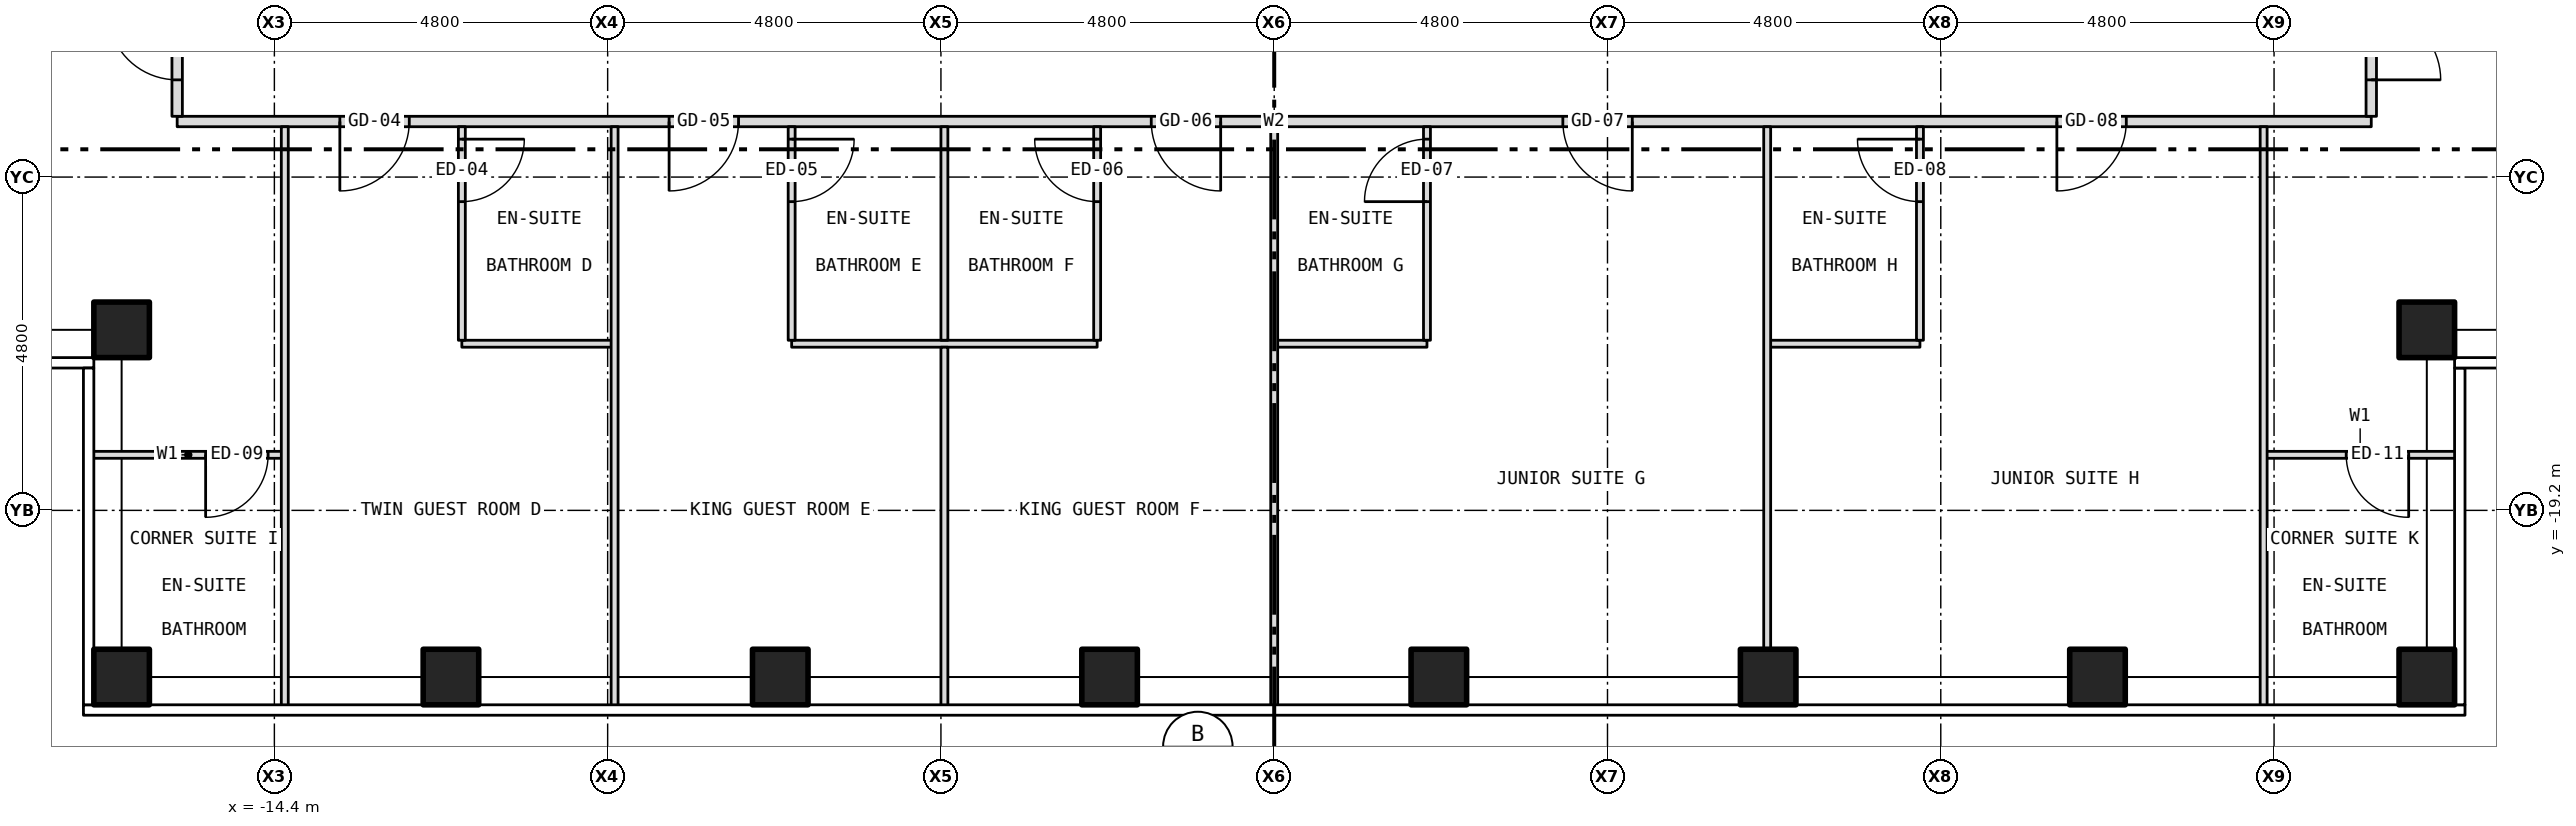
"""IFC4 building model, lengths in metres.
Left out: names, types, materials, properties, quantities, classifications, styles, units other than length and angle.
Written with IfcOpenShell. Run it as: python <this file> out.ifc"""

import sys

from ifc_helpers import new_model, si_unit, direction, frame, frame_2d, origin, origin_2d, place, context, subcontext, project, spatial, rectangle, hollow_rectangle, extrude, element, fill, save


model = new_model("IFC4")
c1 = context("Model", 3, precision=1e-05, world=origin(), true_north=direction((0.0, 1.0)))
c2 = subcontext(c1, "Body", "Model", "MODEL_VIEW")
j1 = project(units=[si_unit("LENGTHUNIT", "METRE"), si_unit("PLANEANGLEUNIT", "RADIAN")], contexts=[c1])
p1 = place(None, origin())
s1 = spatial("IfcSite", under=j1, at=p1, CompositionType="ELEMENT")
p2 = place(p1, origin())
s2 = spatial("IfcBuilding", under=s1, at=p2, CompositionType="ELEMENT")
p3 = place(p2, frame((0.0, 0.0, 151.5)))
s3 = spatial("IfcBuildingStorey", under=s2, at=p3, CompositionType="ELEMENT", Elevation=151.5)
for number, where, z_axis, x_axis in (
    (1, (-16.6, -21.6, -0.15), (0.0, 0.0, 1.0), (1.0, 0.0, 0.0)),
    (2, (-11.857, -21.6, -0.15), (0.0, 0.0, 1.0), (1.0, 0.0, 0.0)),
    (3, (-7.114, -21.6, -0.15), (0.0, 0.0, 1.0), (1.0, 0.0, 0.0)),
    (4, (-2.371, -21.6, -0.15), (0.0, 0.0, 1.0), (1.0, 0.0, 0.0)),
    (5, (2.371, -21.6, -0.15), (0.0, 0.0, 1.0), (1.0, 0.0, 0.0)),
    (6, (7.114, -21.6, -0.15), (0.0, 0.0, 1.0), (1.0, 0.0, 0.0)),
    (7, (11.857, -21.6, -0.15), (0.0, 0.0, 1.0), (1.0, 0.0, 0.0)),
    (8, (16.6, -21.6, -0.15), (0.0, 0.0, 1.0), (1.0, 0.0, 0.0)),
    (9, (-16.6, -16.6, -0.15), (0.0, 0.0, 1.0), (1.0, 0.0, 0.0)),
    (10, (16.6, -16.6, -0.15), (0.0, 0.0, 1.0), (1.0, 0.0, 0.0)),
):
    element("IfcColumn", number, at=place(p3, frame(where, z_axis=z_axis, x_axis=x_axis)), inside=s3, PredefinedType="COLUMN", context=c2, shape_type="SweptSolid", body=[
        extrude(hollow_rectangle(XDim=0.8, YDim=0.8, WallThickness=0.045, at=origin_2d()), origin(), (0.0, 0.0, 1.0), 3.5),
    ])
p4 = place(p3, frame((-17.03, -18.4, 0.0), z_axis=(0.0, 0.0, 1.0), x_axis=(1.0, 0.0, 0.0)))
e11 = element("IfcWall", 11, at=p4, inside=s3, PredefinedType="PARTITIONING", context=c2, shape_type="SweptSolid", body=[
    extrude(rectangle(XDim=2.78, YDim=0.1, at=frame_2d((1.39, 0.0))), origin(), (0.0, 0.0, 1.0), 3.35),
])
p5 = place(p4, frame((1.64, 0.0, 0.0)))
e12 = element("IfcOpeningElement", 12, at=p5, cuts=e11, PredefinedType="OPENING", context=c2, shape_type="SweptSolid", body=[
    extrude(rectangle(XDim=0.9, YDim=2.1, at=frame_2d((0.45, 1.05))), frame((0.0, 0.062, 0.0), z_axis=(0.0, -1.0, 0.0), x_axis=(1.0, 0.0, 0.0)), (0.0, 0.0, 1.0), 0.124),
])
p6 = place(p3, frame((14.25, -18.4, 0.0), z_axis=(0.0, 0.0, 1.0), x_axis=(1.0, 0.0, 0.0)))
e13 = element("IfcWall", 13, at=p6, inside=s3, PredefinedType="PARTITIONING", context=c2, shape_type="SweptSolid", body=[
    extrude(rectangle(XDim=2.78, YDim=0.1, at=frame_2d((1.39, 0.0))), origin(), (0.0, 0.0, 1.0), 3.35),
])
p7 = place(p6, frame((1.189, 0.0, 0.0)))
e14 = element("IfcOpeningElement", 14, at=p7, cuts=e13, PredefinedType="OPENING", context=c2, shape_type="SweptSolid", body=[
    extrude(rectangle(XDim=0.9, YDim=2.1, at=frame_2d((0.45, 1.05))), frame((0.0, 0.062, 0.0), z_axis=(0.0, -1.0, 0.0), x_axis=(1.0, 0.0, 0.0)), (0.0, 0.0, 1.0), 0.124),
])
p8 = place(p3, frame((-11.7, -16.8, 0.0), z_axis=(0.0, 0.0, 1.0), x_axis=(1.0, 0.0, 0.0)))
e15 = element("IfcWall", 15, at=p8, inside=s3, PredefinedType="PARTITIONING", context=c2, shape_type="SweptSolid", body=[
    extrude(rectangle(XDim=2.2, YDim=0.1, at=frame_2d((1.1, 0.0))), origin(), (0.0, 0.0, 1.0), 3.35),
])
p9 = place(p3, frame((-6.95, -16.8, 0.0), z_axis=(0.0, 0.0, 1.0), x_axis=(1.0, 0.0, 0.0)))
e16 = element("IfcWall", 16, at=p9, inside=s3, PredefinedType="PARTITIONING", context=c2, shape_type="SweptSolid", body=[
    extrude(rectangle(XDim=4.4, YDim=0.1, at=frame_2d((2.2, 0.0))), origin(), (0.0, 0.0, 1.0), 3.35),
])
for number, where, z_axis, x_axis in (
    (17, (0.0, -16.8, 0.0), (0.0, 0.0, 1.0), (1.0, 0.0, 0.0)),
    (18, (7.1, -16.8, 0.0), (0.0, 0.0, 1.0), (1.0, 0.0, 0.0)),
):
    element("IfcWall", number, at=place(p3, frame(where, z_axis=z_axis, x_axis=x_axis)), inside=s3, PredefinedType="PARTITIONING", context=c2, shape_type="SweptSolid", body=[
        extrude(rectangle(XDim=2.2, YDim=0.1, at=frame_2d((1.1, 0.0))), origin(), (0.0, 0.0, 1.0), 3.35),
    ])
p10 = place(p3, frame((-15.8, -13.6, 0.0), z_axis=(0.0, 0.0, 1.0), x_axis=(1.0, 0.0, 0.0)))
e19 = element("IfcWall", 19, at=p10, inside=s3, PredefinedType="PARTITIONING", context=c2, shape_type="SweptSolid", body=[
    extrude(rectangle(XDim=31.6, YDim=0.15, at=frame_2d((15.8, 0.0))), origin(), (0.0, 0.0, 1.0), 3.35),
])
p11 = place(p10, frame((2.343, 0.0, 0.0)))
e20 = element("IfcOpeningElement", 20, at=p11, cuts=e19, PredefinedType="OPENING", context=c2, shape_type="SweptSolid", body=[
    extrude(rectangle(XDim=1.0, YDim=2.1, at=frame_2d((0.5, 1.05))), frame((0.0, 0.087, 0.0), z_axis=(0.0, -1.0, 0.0), x_axis=(1.0, 0.0, 0.0)), (0.0, 0.0, 1.0), 0.174),
])
p12 = place(p10, frame((7.085, 0.0, 0.0)))
e21 = element("IfcOpeningElement", 21, at=p12, cuts=e19, PredefinedType="OPENING", context=c2, shape_type="SweptSolid", body=[
    extrude(rectangle(XDim=1.0, YDim=2.1, at=frame_2d((0.5, 1.05))), frame((0.0, 0.087, 0.0), z_axis=(0.0, -1.0, 0.0), x_axis=(1.0, 0.0, 0.0)), (0.0, 0.0, 1.0), 0.174),
])
p13 = place(p10, frame((14.029, 0.0, 0.0)))
e22 = element("IfcOpeningElement", 22, at=p13, cuts=e19, PredefinedType="OPENING", context=c2, shape_type="SweptSolid", body=[
    extrude(rectangle(XDim=1.0, YDim=2.1, at=frame_2d((0.5, 1.05))), frame((0.0, 0.087, 0.0), z_axis=(0.0, -1.0, 0.0), x_axis=(1.0, 0.0, 0.0)), (0.0, 0.0, 1.0), 0.174),
])
p14 = place(p10, frame((19.957, 0.0, 0.0)))
e23 = element("IfcOpeningElement", 23, at=p14, cuts=e19, PredefinedType="OPENING", context=c2, shape_type="SweptSolid", body=[
    extrude(rectangle(XDim=1.0, YDim=2.1, at=frame_2d((0.5, 1.05))), frame((0.0, 0.087, 0.0), z_axis=(0.0, -1.0, 0.0), x_axis=(1.0, 0.0, 0.0)), (0.0, 0.0, 1.0), 0.174),
])
p15 = place(p10, frame((27.072, 0.0, 0.0)))
e24 = element("IfcOpeningElement", 24, at=p15, cuts=e19, PredefinedType="OPENING", context=c2, shape_type="SweptSolid", body=[
    extrude(rectangle(XDim=1.0, YDim=2.1, at=frame_2d((0.5, 1.05))), frame((0.0, 0.087, 0.0), z_axis=(0.0, -1.0, 0.0), x_axis=(1.0, 0.0, 0.0)), (0.0, 0.0, 1.0), 0.174),
])
p16 = place(p3, frame((-15.8, -13.525, 0.0), z_axis=(0.0, 0.0, 1.0), x_axis=(0.0, 1.0, 0.0)))
e25 = element("IfcWall", 25, at=p16, inside=s3, PredefinedType="PARTITIONING", context=c2, shape_type="SweptSolid", body=[
    extrude(rectangle(XDim=2.605, YDim=0.15, at=frame_2d((1.302, 0.0))), origin(), (0.0, 0.0, 1.0), 3.35),
])
p17 = place(p16, frame((0.525, 0.0, 0.0)))
e26 = element("IfcOpeningElement", 26, at=p17, cuts=e25, PredefinedType="OPENING", context=c2, shape_type="SweptSolid", body=[
    extrude(rectangle(XDim=1.0, YDim=2.1, at=frame_2d((0.5, 1.05))), frame((0.0, 0.087, 0.0), z_axis=(0.0, -1.0, 0.0), x_axis=(1.0, 0.0, 0.0)), (0.0, 0.0, 1.0), 0.174),
])
p18 = place(p3, frame((-14.25, -22.03, 0.0), z_axis=(0.0, 0.0, 1.0), x_axis=(0.0, 1.0, 0.0)))
e27 = element("IfcWall", 27, at=p18, inside=s3, PredefinedType="PARTITIONING", context=c2, shape_type="SweptSolid", body=[
    extrude(rectangle(XDim=8.355, YDim=0.1, at=frame_2d((4.177, 0.0))), origin(), (0.0, 0.0, 1.0), 2.817),
])
p19 = place(p3, frame((-11.7, -16.75, 0.0), z_axis=(0.0, 0.0, 1.0), x_axis=(0.0, 1.0, 0.0)))
e28 = element("IfcWall", 28, at=p19, inside=s3, PredefinedType="PARTITIONING", context=c2, shape_type="SweptSolid", body=[
    extrude(rectangle(XDim=3.075, YDim=0.1, at=frame_2d((1.538, 0.0))), origin(), (0.0, 0.0, 1.0), 3.35),
])
p20 = place(p19, frame((1.996, 0.0, 0.0)))
e29 = element("IfcOpeningElement", 29, at=p20, cuts=e28, PredefinedType="OPENING", context=c2, shape_type="SweptSolid", body=[
    extrude(rectangle(XDim=0.9, YDim=2.1, at=frame_2d((0.45, 1.05))), frame((0.0, 0.062, 0.0), z_axis=(0.0, -1.0, 0.0), x_axis=(1.0, 0.0, 0.0)), (0.0, 0.0, 1.0), 0.124),
])
p21 = place(p3, frame((-9.5, -22.03, 0.0), z_axis=(0.0, 0.0, 1.0), x_axis=(0.0, 1.0, 0.0)))
e30 = element("IfcWall", 30, at=p21, inside=s3, PredefinedType="PARTITIONING", context=c2, shape_type="SweptSolid", body=[
    extrude(rectangle(XDim=8.355, YDim=0.1, at=frame_2d((4.177, 0.0))), origin(), (0.0, 0.0, 1.0), 2.728),
])
p22 = place(p3, frame((-6.95, -16.75, 0.0), z_axis=(0.0, 0.0, 1.0), x_axis=(0.0, 1.0, 0.0)))
e31 = element("IfcWall", 31, at=p22, inside=s3, PredefinedType="PARTITIONING", context=c2, shape_type="SweptSolid", body=[
    extrude(rectangle(XDim=3.075, YDim=0.1, at=frame_2d((1.538, 0.0))), origin(), (0.0, 0.0, 1.0), 3.35),
])
p23 = place(p22, frame((1.996, 0.0, 0.0)))
e32 = element("IfcOpeningElement", 32, at=p23, cuts=e31, PredefinedType="OPENING", context=c2, shape_type="SweptSolid", body=[
    extrude(rectangle(XDim=0.9, YDim=2.1, at=frame_2d((0.45, 1.05))), frame((0.0, 0.062, 0.0), z_axis=(0.0, -1.0, 0.0), x_axis=(1.0, 0.0, 0.0)), (0.0, 0.0, 1.0), 0.124),
])
p24 = place(p3, frame((-4.75, -22.03, 0.0), z_axis=(0.0, 0.0, 1.0), x_axis=(0.0, 1.0, 0.0)))
e33 = element("IfcWall", 33, at=p24, inside=s3, PredefinedType="PARTITIONING", context=c2, shape_type="SweptSolid", body=[
    extrude(rectangle(XDim=5.18, YDim=0.1, at=frame_2d((2.59, 0.0))), origin(), (0.0, 0.0, 1.0), 2.817),
])
p25 = place(p3, frame((-4.75, -16.75, 0.0), z_axis=(0.0, 0.0, 1.0), x_axis=(0.0, 1.0, 0.0)))
e34 = element("IfcWall", 34, at=p25, inside=s3, PredefinedType="PARTITIONING", context=c2, shape_type="SweptSolid", body=[
    extrude(rectangle(XDim=3.075, YDim=0.1, at=frame_2d((1.538, 0.0))), origin(), (0.0, 0.0, 1.0), 2.817),
])
p26 = place(p3, frame((-2.55, -16.75, 0.0), z_axis=(0.0, 0.0, 1.0), x_axis=(0.0, 1.0, 0.0)))
e35 = element("IfcWall", 35, at=p26, inside=s3, PredefinedType="PARTITIONING", context=c2, shape_type="SweptSolid", body=[
    extrude(rectangle(XDim=3.075, YDim=0.1, at=frame_2d((1.538, 0.0))), origin(), (0.0, 0.0, 1.0), 3.35),
])
p27 = place(p26, frame((1.996, 0.0, 0.0)))
e36 = element("IfcOpeningElement", 36, at=p27, cuts=e35, PredefinedType="OPENING", context=c2, shape_type="SweptSolid", body=[
    extrude(rectangle(XDim=0.9, YDim=2.1, at=frame_2d((0.45, 1.05))), frame((0.0, 0.062, 0.0), z_axis=(0.0, -1.0, 0.0), x_axis=(1.0, 0.0, 0.0)), (0.0, 0.0, 1.0), 0.124),
])
p28 = place(p3, frame((0.0, -22.03, 0.0), z_axis=(0.0, 0.0, 1.0), x_axis=(0.0, 1.0, 0.0)))
e37 = element("IfcWall", 37, at=p28, inside=s3, PredefinedType="PARTITIONING", context=c2, shape_type="SweptSolid", body=[
    extrude(rectangle(XDim=8.355, YDim=0.1, at=frame_2d((4.177, 0.0))), origin(), (0.0, 0.0, 1.0), 2.728),
])
p29 = place(p3, frame((2.2, -16.75, 0.0), z_axis=(0.0, 0.0, 1.0), x_axis=(0.0, 1.0, 0.0)))
e38 = element("IfcWall", 38, at=p29, inside=s3, PredefinedType="PARTITIONING", context=c2, shape_type="SweptSolid", body=[
    extrude(rectangle(XDim=3.075, YDim=0.1, at=frame_2d((1.538, 0.0))), origin(), (0.0, 0.0, 1.0), 3.35),
])
p30 = place(p29, frame((1.996, 0.0, 0.0)))
e39 = element("IfcOpeningElement", 39, at=p30, cuts=e38, PredefinedType="OPENING", context=c2, shape_type="SweptSolid", body=[
    extrude(rectangle(XDim=0.9, YDim=2.1, at=frame_2d((0.45, 1.05))), frame((0.0, 0.062, 0.0), z_axis=(0.0, -1.0, 0.0), x_axis=(1.0, 0.0, 0.0)), (0.0, 0.0, 1.0), 0.124),
])
p31 = place(p3, frame((7.1, -21.48, 0.0), z_axis=(0.0, 0.0, 1.0), x_axis=(0.0, 1.0, 0.0)))
e40 = element("IfcWall", 40, at=p31, inside=s3, PredefinedType="PARTITIONING", context=c2, shape_type="SweptSolid", body=[
    extrude(rectangle(XDim=7.805, YDim=0.1, at=frame_2d((3.902, 0.0))), origin(), (0.0, 0.0, 1.0), 3.35),
])
p32 = place(p3, frame((9.3, -16.75, 0.0), z_axis=(0.0, 0.0, 1.0), x_axis=(0.0, 1.0, 0.0)))
e41 = element("IfcWall", 41, at=p32, inside=s3, PredefinedType="PARTITIONING", context=c2, shape_type="SweptSolid", body=[
    extrude(rectangle(XDim=3.075, YDim=0.1, at=frame_2d((1.538, 0.0))), origin(), (0.0, 0.0, 1.0), 3.35),
])
p33 = place(p32, frame((1.996, 0.0, 0.0)))
e42 = element("IfcOpeningElement", 42, at=p33, cuts=e41, PredefinedType="OPENING", context=c2, shape_type="SweptSolid", body=[
    extrude(rectangle(XDim=0.9, YDim=2.1, at=frame_2d((0.45, 1.05))), frame((0.0, 0.062, 0.0), z_axis=(0.0, -1.0, 0.0), x_axis=(1.0, 0.0, 0.0)), (0.0, 0.0, 1.0), 0.124),
])
p34 = place(p3, frame((14.25, -22.03, 0.0), z_axis=(0.0, 0.0, 1.0), x_axis=(0.0, 1.0, 0.0)))
e43 = element("IfcWall", 43, at=p34, inside=s3, PredefinedType="PARTITIONING", context=c2, shape_type="SweptSolid", body=[
    extrude(rectangle(XDim=8.355, YDim=0.1, at=frame_2d((4.177, 0.0))), origin(), (0.0, 0.0, 1.0), 2.817),
])
p35 = place(p3, frame((15.8, -13.525, 0.0), z_axis=(0.0, 0.0, 1.0), x_axis=(0.0, 1.0, 0.0)))
e44 = element("IfcWall", 44, at=p35, inside=s3, PredefinedType="PARTITIONING", context=c2, shape_type="SweptSolid", body=[
    extrude(rectangle(XDim=2.605, YDim=0.15, at=frame_2d((1.302, 0.0))), origin(), (0.0, 0.0, 1.0), 3.35),
])
p36 = place(p35, frame((0.525, 0.0, 0.0)))
e45 = element("IfcOpeningElement", 45, at=p36, cuts=e44, PredefinedType="OPENING", context=c2, shape_type="SweptSolid", body=[
    extrude(rectangle(XDim=1.0, YDim=2.1, at=frame_2d((0.5, 1.05))), frame((0.0, 0.087, 0.0), z_axis=(0.0, -1.0, 0.0), x_axis=(1.0, 0.0, 0.0)), (0.0, 0.0, 1.0), 0.174),
])
p37 = place(p11, origin())
e46 = element("IfcDoor", 46, at=p37, inside=s3, OperationType="SINGLE_SWING_LEFT", PredefinedType="DOOR", context=c2, shape_type="SweptSolid", body=[
    extrude(rectangle(XDim=1.0, YDim=2.1, at=frame_2d((0.5, 1.05))), frame((0.0, 0.025, 0.0), z_axis=(0.0, -1.0, 0.0), x_axis=(1.0, 0.0, 0.0)), (0.0, 0.0, 1.0), 0.05),
])
fill(e20, e46)
p38 = place(p20, origin())
e47 = element("IfcDoor", 47, at=p38, inside=s3, OperationType="SINGLE_SWING_RIGHT", PredefinedType="DOOR", context=c2, shape_type="SweptSolid", body=[
    extrude(rectangle(XDim=0.9, YDim=2.1, at=frame_2d((0.45, 1.05))), frame((0.0, 0.025, 0.0), z_axis=(0.0, -1.0, 0.0), x_axis=(1.0, 0.0, 0.0)), (0.0, 0.0, 1.0), 0.05),
])
fill(e29, e47)
p39 = place(p12, origin())
e48 = element("IfcDoor", 48, at=p39, inside=s3, OperationType="SINGLE_SWING_LEFT", PredefinedType="DOOR", context=c2, shape_type="SweptSolid", body=[
    extrude(rectangle(XDim=1.0, YDim=2.1, at=frame_2d((0.5, 1.05))), frame((0.0, 0.025, 0.0), z_axis=(0.0, -1.0, 0.0), x_axis=(1.0, 0.0, 0.0)), (0.0, 0.0, 1.0), 0.05),
])
fill(e21, e48)
p40 = place(p23, origin())
e49 = element("IfcDoor", 49, at=p40, inside=s3, OperationType="SINGLE_SWING_RIGHT", PredefinedType="DOOR", context=c2, shape_type="SweptSolid", body=[
    extrude(rectangle(XDim=0.9, YDim=2.1, at=frame_2d((0.45, 1.05))), frame((0.0, 0.025, 0.0), z_axis=(0.0, -1.0, 0.0), x_axis=(1.0, 0.0, 0.0)), (0.0, 0.0, 1.0), 0.05),
])
fill(e32, e49)
p41 = place(p13, origin())
e50 = element("IfcDoor", 50, at=p41, inside=s3, OperationType="SINGLE_SWING_RIGHT", PredefinedType="DOOR", context=c2, shape_type="SweptSolid", body=[
    extrude(rectangle(XDim=1.0, YDim=2.1, at=frame_2d((0.5, 1.05))), frame((0.0, 0.025, 0.0), z_axis=(0.0, -1.0, 0.0), x_axis=(1.0, 0.0, 0.0)), (0.0, 0.0, 1.0), 0.05),
])
fill(e22, e50)
p42 = place(p27, origin())
e51 = element("IfcDoor", 51, at=p42, inside=s3, OperationType="SINGLE_SWING_RIGHT", PredefinedType="DOOR", context=c2, shape_type="SweptSolid", body=[
    extrude(rectangle(XDim=0.9, YDim=2.1, at=frame_2d((0.45, 1.05))), frame((0.0, 0.025, 0.0), z_axis=(0.0, -1.0, 0.0), x_axis=(1.0, 0.0, 0.0)), (0.0, 0.0, 1.0), 0.05),
])
fill(e36, e51)
p43 = place(p14, origin())
e52 = element("IfcDoor", 52, at=p43, inside=s3, OperationType="SINGLE_SWING_RIGHT", PredefinedType="DOOR", context=c2, shape_type="SweptSolid", body=[
    extrude(rectangle(XDim=1.0, YDim=2.1, at=frame_2d((0.5, 1.05))), frame((0.0, 0.025, 0.0), z_axis=(0.0, -1.0, 0.0), x_axis=(1.0, 0.0, 0.0)), (0.0, 0.0, 1.0), 0.05),
])
fill(e23, e52)
p44 = place(p30, origin())
e53 = element("IfcDoor", 53, at=p44, inside=s3, OperationType="SINGLE_SWING_LEFT", PredefinedType="DOOR", context=c2, shape_type="SweptSolid", body=[
    extrude(rectangle(XDim=0.9, YDim=2.1, at=frame_2d((0.45, 1.05))), frame((0.0, 0.025, 0.0), z_axis=(0.0, -1.0, 0.0), x_axis=(1.0, 0.0, 0.0)), (0.0, 0.0, 1.0), 0.05),
])
fill(e39, e53)
p45 = place(p15, origin())
e54 = element("IfcDoor", 54, at=p45, inside=s3, OperationType="SINGLE_SWING_LEFT", PredefinedType="DOOR", context=c2, shape_type="SweptSolid", body=[
    extrude(rectangle(XDim=1.0, YDim=2.1, at=frame_2d((0.5, 1.05))), frame((0.0, 0.025, 0.0), z_axis=(0.0, -1.0, 0.0), x_axis=(1.0, 0.0, 0.0)), (0.0, 0.0, 1.0), 0.05),
])
fill(e24, e54)
p46 = place(p33, origin())
e55 = element("IfcDoor", 55, at=p46, inside=s3, OperationType="SINGLE_SWING_RIGHT", PredefinedType="DOOR", context=c2, shape_type="SweptSolid", body=[
    extrude(rectangle(XDim=0.9, YDim=2.1, at=frame_2d((0.45, 1.05))), frame((0.0, 0.025, 0.0), z_axis=(0.0, -1.0, 0.0), x_axis=(1.0, 0.0, 0.0)), (0.0, 0.0, 1.0), 0.05),
])
fill(e42, e55)
p47 = place(p5, origin())
e56 = element("IfcDoor", 56, at=p47, inside=s3, OperationType="SINGLE_SWING_LEFT", PredefinedType="DOOR", context=c2, shape_type="SweptSolid", body=[
    extrude(rectangle(XDim=0.9, YDim=2.1, at=frame_2d((0.45, 1.05))), frame((0.0, 0.025, 0.0), z_axis=(0.0, -1.0, 0.0), x_axis=(1.0, 0.0, 0.0)), (0.0, 0.0, 1.0), 0.05),
])
fill(e12, e56)
p48 = place(p17, origin())
e57 = element("IfcDoor", 57, at=p48, inside=s3, OperationType="SINGLE_SWING_RIGHT", PredefinedType="DOOR", context=c2, shape_type="SweptSolid", body=[
    extrude(rectangle(XDim=1.0, YDim=2.1, at=frame_2d((0.5, 1.05))), frame((0.0, 0.025, 0.0), z_axis=(0.0, -1.0, 0.0), x_axis=(1.0, 0.0, 0.0)), (0.0, 0.0, 1.0), 0.05),
])
fill(e26, e57)
p49 = place(p7, origin())
e58 = element("IfcDoor", 58, at=p49, inside=s3, OperationType="SINGLE_SWING_RIGHT", PredefinedType="DOOR", context=c2, shape_type="SweptSolid", body=[
    extrude(rectangle(XDim=0.9, YDim=2.1, at=frame_2d((0.45, 1.05))), frame((0.0, 0.025, 0.0), z_axis=(0.0, -1.0, 0.0), x_axis=(1.0, 0.0, 0.0)), (0.0, 0.0, 1.0), 0.05),
])
fill(e14, e58)
p50 = place(p36, origin())
e59 = element("IfcDoor", 59, at=p50, inside=s3, OperationType="SINGLE_SWING_LEFT", PredefinedType="DOOR", context=c2, shape_type="SweptSolid", body=[
    extrude(rectangle(XDim=1.0, YDim=2.1, at=frame_2d((0.5, 1.05))), frame((0.0, 0.025, 0.0), z_axis=(0.0, -1.0, 0.0), x_axis=(1.0, 0.0, 0.0)), (0.0, 0.0, 1.0), 0.05),
])
fill(e45, e59)
save(model, sys.argv[1])
